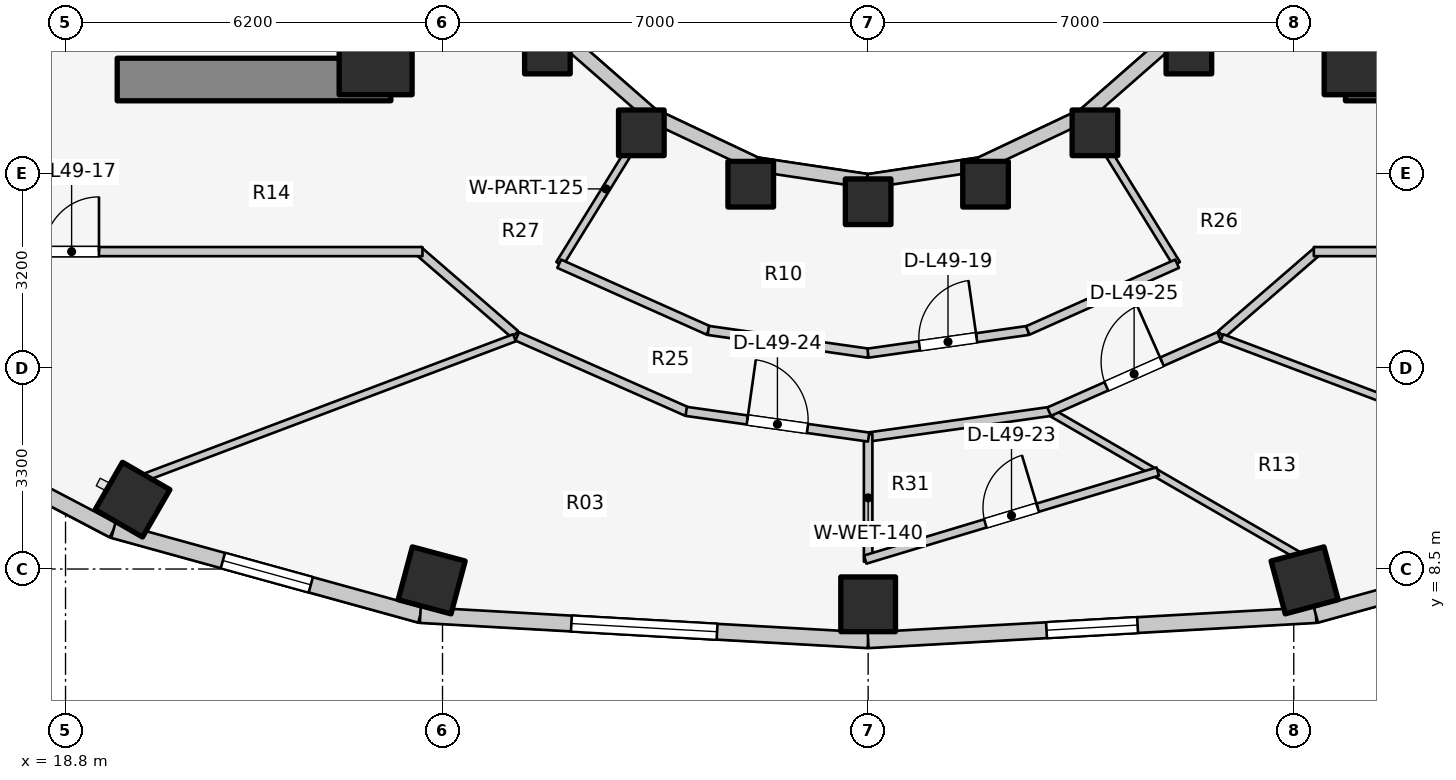
"""IFC4 building model, lengths in metres.
Left out: names, types, materials, properties, quantities, classifications, styles, units other than length and angle.
Written with IfcOpenShell. Run it as: python <this file> out.ifc"""

import sys

from ifc_helpers import new_model, si_unit, direction, frame, frame_2d, origin, origin_2d, place, context, subcontext, project, spatial, rectangle, extrude, element, fill, save


model = new_model("IFC4")
c1 = context("Model", 3, precision=1e-05, world=origin(), true_north=direction((0.0, 1.0)))
c2 = subcontext(c1, "Body", "Model", "MODEL_VIEW")
j1 = project(units=[si_unit("LENGTHUNIT", "METRE"), si_unit("PLANEANGLEUNIT", "RADIAN")], contexts=[c1])
p1 = place(None, origin())
s1 = spatial("IfcSite", under=j1, at=p1, CompositionType="ELEMENT")
p2 = place(p1, origin())
s2 = spatial("IfcBuilding", under=s1, at=p2, CompositionType="ELEMENT")
p3 = place(p2, frame((0.0, 0.0, 162.2)))
s3 = spatial("IfcBuildingStorey", under=s2, at=p3, CompositionType="ELEMENT", Elevation=162.2)
for number, where, z_axis, x_axis in (
    (1, (19.65, 16.55, 0.0), (0.0, 0.0, 1.0), (1.0, 0.0, 0.0)),
    (2, (39.85, 16.55, 0.0), (0.0, 0.0, 1.0), (1.0, 0.0, 0.0)),
):
    element("IfcWall", number, at=place(p3, frame(where, z_axis=z_axis, x_axis=x_axis)), inside=s3, PredefinedType="SHEAR", context=c2, shape_type="SweptSolid", body=[
        extrude(rectangle(XDim=4.5, YDim=0.7, at=frame_2d((2.25, 0.0))), origin(), (0.0, 0.0, 1.0), 3.1),
    ])
for number, where, z_axis, x_axis in (
    (3, (23.9, 16.9, 0.0), (0.0, 0.0, 1.0), (1.0, 0.0, 0.0)),
    (4, (40.1, 16.9, 0.0), (0.0, 0.0, 1.0), (1.0, 0.0, 0.0)),
):
    element("IfcColumn", number, at=place(p3, frame(where, z_axis=z_axis, x_axis=x_axis)), inside=s3, PredefinedType="COLUMN", context=c2, shape_type="SweptSolid", body=[
        extrude(rectangle(XDim=1.2, YDim=1.2, at=origin_2d()), origin(), (0.0, 0.0, 1.0), 3.1),
    ])
for number, where, z_axis, x_axis in (
    (5, (26.725, 17.018, 0.0), (0.0, 0.0, 1.0), (1.0, 0.0, 0.0)),
    (6, (28.27, 15.673, 0.0), (0.0, 0.0, 1.0), (1.0, 0.0, 0.0)),
):
    element("IfcColumn", number, at=place(p3, frame(where, z_axis=z_axis, x_axis=x_axis)), inside=s3, PredefinedType="COLUMN", context=c2, shape_type="SweptSolid", body=[
        extrude(rectangle(XDim=0.75, YDim=0.75, at=origin_2d()), origin(), (0.0, 0.0, 1.0), 3.1),
    ])
p4 = place(p3, frame((19.902, 9.641, 0.0), z_axis=(0.0, 0.0, 1.0), x_axis=(-0.5, -0.866025403784, 0.0)))
e7 = element("IfcColumn", 7, at=p4, inside=s3, PredefinedType="COLUMN", context=c2, shape_type="SweptSolid", body=[
    extrude(rectangle(XDim=0.9, YDim=0.9, at=origin_2d()), origin(), (0.0, 0.0, 1.0), 3.1),
])
p5 = place(p3, frame((30.069, 14.828, 0.0), z_axis=(0.0, 0.0, 1.0), x_axis=(1.0, 0.0, 0.0)))
e8 = element("IfcColumn", 8, at=p5, inside=s3, PredefinedType="COLUMN", context=c2, shape_type="SweptSolid", body=[
    extrude(rectangle(XDim=0.75, YDim=0.75, at=origin_2d()), origin(), (0.0, 0.0, 1.0), 3.1),
])
p6 = place(p3, frame((24.822, 8.313, 0.0), z_axis=(0.0, 0.0, 1.0), x_axis=(-0.258819045103, -0.965925826289, 0.0)))
e9 = element("IfcColumn", 9, at=p6, inside=s3, PredefinedType="COLUMN", context=c2, shape_type="SweptSolid", body=[
    extrude(rectangle(XDim=0.9, YDim=0.9, at=origin_2d()), origin(), (0.0, 0.0, 1.0), 3.1),
])
p7 = place(p3, frame((32.0, 14.54, 0.0), z_axis=(0.0, 0.0, 1.0), x_axis=(1.0, 0.0, 0.0)))
e10 = element("IfcColumn", 10, at=p7, inside=s3, PredefinedType="COLUMN", context=c2, shape_type="SweptSolid", body=[
    extrude(rectangle(XDim=0.75, YDim=0.75, at=origin_2d()), origin(), (0.0, 0.0, 1.0), 3.1),
])
p8 = place(p3, frame((32.0, 7.92, 0.0), z_axis=(0.0, 0.0, 1.0), x_axis=(0.0, -1.0, 0.0)))
e11 = element("IfcColumn", 11, at=p8, inside=s3, PredefinedType="COLUMN", context=c2, shape_type="SweptSolid", body=[
    extrude(rectangle(XDim=0.9, YDim=0.9, at=origin_2d()), origin(), (0.0, 0.0, 1.0), 3.1),
])
p9 = place(p3, frame((33.931, 14.828, 0.0), z_axis=(0.0, 0.0, 1.0), x_axis=(1.0, 0.0, 0.0)))
e12 = element("IfcColumn", 12, at=p9, inside=s3, PredefinedType="COLUMN", context=c2, shape_type="SweptSolid", body=[
    extrude(rectangle(XDim=0.75, YDim=0.75, at=origin_2d()), origin(), (0.0, 0.0, 1.0), 3.1),
])
p10 = place(p3, frame((39.178, 8.313, 0.0), z_axis=(0.0, 0.0, 1.0), x_axis=(0.258819045103, -0.965925826289, 0.0)))
e13 = element("IfcColumn", 13, at=p10, inside=s3, PredefinedType="COLUMN", context=c2, shape_type="SweptSolid", body=[
    extrude(rectangle(XDim=0.9, YDim=0.9, at=origin_2d()), origin(), (0.0, 0.0, 1.0), 3.1),
])
for number, where, z_axis, x_axis in (
    (14, (35.73, 15.673, 0.0), (0.0, 0.0, 1.0), (1.0, 0.0, 0.0)),
    (15, (37.275, 17.018, 0.0), (0.0, 0.0, 1.0), (1.0, 0.0, 0.0)),
):
    element("IfcColumn", number, at=place(p3, frame(where, z_axis=z_axis, x_axis=x_axis)), inside=s3, PredefinedType="COLUMN", context=c2, shape_type="SweptSolid", body=[
        extrude(rectangle(XDim=0.75, YDim=0.75, at=origin_2d()), origin(), (0.0, 0.0, 1.0), 3.1),
    ])
p11 = place(p3, frame((26.965, 17.258, 0.0), z_axis=(0.0, 0.0, 1.0), x_axis=(0.752576694707, -0.658504607869, 0.0)))
e16 = element("IfcWall", 16, at=p11, inside=s3, PredefinedType="STANDARD", context=c2, shape_type="SweptSolid", body=[
    extrude(rectangle(XDim=1.959, YDim=0.23, at=frame_2d((0.98, 0.0))), origin(), (0.0, 0.0, 1.0), 2.16),
])
p12 = place(p3, frame((28.44, 15.968, 0.0), z_axis=(0.0, 0.0, 1.0), x_axis=(0.904179699603, -0.427152280606, 0.0)))
e17 = element("IfcWall", 17, at=p12, inside=s3, PredefinedType="STANDARD", context=c2, shape_type="SweptSolid", body=[
    extrude(rectangle(XDim=1.899, YDim=0.23, at=frame_2d((0.95, 0.0))), origin(), (0.0, 0.0, 1.0), 2.16),
])
for number, where, z_axis, x_axis in (
    (18, (30.157, 15.157, 0.0), (0.0, 0.0, 1.0), (0.989, -0.149, 0.0)),
    (19, (32.0, 14.88, 0.0), (0.0, 0.0, 1.0), (0.989, 0.149, 0.0)),
):
    element("IfcWall", number, at=place(p3, frame(where, z_axis=z_axis, x_axis=x_axis)), inside=s3, PredefinedType="STANDARD", context=c2, shape_type="SweptSolid", body=[
        extrude(rectangle(XDim=1.864, YDim=0.23, at=frame_2d((0.932, 0.0))), origin(), (0.0, 0.0, 1.0), 2.16),
    ])
p13 = place(p3, frame((33.843, 15.157, 0.0), z_axis=(0.0, 0.0, 1.0), x_axis=(0.904179699603, 0.427152280606, 0.0)))
e20 = element("IfcWall", 20, at=p13, inside=s3, PredefinedType="STANDARD", context=c2, shape_type="SweptSolid", body=[
    extrude(rectangle(XDim=1.899, YDim=0.23, at=frame_2d((0.95, 0.0))), origin(), (0.0, 0.0, 1.0), 2.16),
])
p14 = place(p3, frame((35.56, 15.968, 0.0), z_axis=(0.0, 0.0, 1.0), x_axis=(0.752576694707, 0.658504607869, 0.0)))
e21 = element("IfcWall", 21, at=p14, inside=s3, PredefinedType="STANDARD", context=c2, shape_type="SweptSolid", body=[
    extrude(rectangle(XDim=1.959, YDim=0.23, at=frame_2d((0.98, 0.0))), origin(), (0.0, 0.0, 1.0), 2.16),
])
p15 = place(p3, frame((15.731, 11.158, 0.0), z_axis=(0.0, 0.0, 1.0), x_axis=(0.885660265226, -0.464333818065, 0.0)))
e22 = element("IfcWall", 22, at=p15, inside=s3, PredefinedType="STANDARD", context=c2, shape_type="SweptSolid", body=[
    extrude(rectangle(XDim=4.354, YDim=0.26, at=frame_2d((2.177, 0.0))), origin(), (0.0, 0.0, 1.0), 2.85),
])
p16 = place(p3, frame((19.587, 9.137, 0.0), z_axis=(0.0, 0.0, 1.0), x_axis=(0.963953455704, -0.26607092144, 0.0)))
e23 = element("IfcWall", 23, at=p16, inside=s3, PredefinedType="STANDARD", context=c2, shape_type="SweptSolid", body=[
    extrude(rectangle(XDim=5.237, YDim=0.26, at=frame_2d((2.618, 0.0))), origin(), (0.0, 0.0, 1.0), 2.85),
])
p17 = place(p16, frame((1.868, 0.0, 0.75)))
e24 = element("IfcOpeningElement", 24, at=p17, cuts=e23, PredefinedType="OPENING", context=c2, shape_type="SweptSolid", body=[
    extrude(rectangle(XDim=1.5, YDim=1.6, at=frame_2d((0.75, 0.8))), frame((0.0, 0.14, 0.0), z_axis=(0.0, -1.0, 0.0), x_axis=(1.0, 0.0, 0.0)), (0.0, 0.0, 1.0), 0.28),
])
p18 = place(p3, frame((24.635, 7.743, 0.0), z_axis=(0.0, 0.0, 1.0), x_axis=(0.998417906562, -0.056228852534, 0.0)))
e25 = element("IfcWall", 25, at=p18, inside=s3, PredefinedType="STANDARD", context=c2, shape_type="SweptSolid", body=[
    extrude(rectangle(XDim=7.377, YDim=0.26, at=frame_2d((3.688, 0.0))), origin(), (0.0, 0.0, 1.0), 2.85),
])
p19 = place(p18, frame((2.488, 0.0, 0.75)))
e26 = element("IfcOpeningElement", 26, at=p19, cuts=e25, PredefinedType="OPENING", context=c2, shape_type="SweptSolid", body=[
    extrude(rectangle(XDim=2.4, YDim=1.7, at=frame_2d((1.2, 0.85))), frame((0.0, 0.14, 0.0), z_axis=(0.0, -1.0, 0.0), x_axis=(1.0, 0.0, 0.0)), (0.0, 0.0, 1.0), 0.28),
])
p20 = place(p3, frame((32.0, 7.329, 0.0), z_axis=(0.0, 0.0, 1.0), x_axis=(0.998417906562, 0.056228852534, 0.0)))
e27 = element("IfcWall", 27, at=p20, inside=s3, PredefinedType="STANDARD", context=c2, shape_type="SweptSolid", body=[
    extrude(rectangle(XDim=7.377, YDim=0.26, at=frame_2d((3.688, 0.0))), origin(), (0.0, 0.0, 1.0), 2.85),
])
p21 = place(p20, frame((2.938, 0.0, 0.75)))
e28 = element("IfcOpeningElement", 28, at=p21, cuts=e27, PredefinedType="OPENING", context=c2, shape_type="SweptSolid", body=[
    extrude(rectangle(XDim=1.5, YDim=1.6, at=frame_2d((0.75, 0.8))), frame((0.0, 0.14, 0.0), z_axis=(0.0, -1.0, 0.0), x_axis=(1.0, 0.0, 0.0)), (0.0, 0.0, 1.0), 0.28),
])
p22 = place(p3, frame((39.365, 7.743, 0.0), z_axis=(0.0, 0.0, 1.0), x_axis=(0.963953455704, 0.26607092144, 0.0)))
e29 = element("IfcWall", 29, at=p22, inside=s3, PredefinedType="STANDARD", context=c2, shape_type="SweptSolid", body=[
    extrude(rectangle(XDim=5.237, YDim=0.26, at=frame_2d((2.618, 0.0))), origin(), (0.0, 0.0, 1.0), 2.85),
])
p23 = place(p22, frame((1.868, 0.0, 0.75)))
e30 = element("IfcOpeningElement", 30, at=p23, cuts=e29, PredefinedType="OPENING", context=c2, shape_type="SweptSolid", body=[
    extrude(rectangle(XDim=1.5, YDim=1.6, at=frame_2d((0.75, 0.8))), frame((0.0, 0.14, 0.0), z_axis=(0.0, -1.0, 0.0), x_axis=(1.0, 0.0, 0.0)), (0.0, 0.0, 1.0), 0.28),
])
p24 = place(p3, frame((26.193, 12.358, 0.0), z_axis=(0.0, 0.0, 1.0), x_axis=(-0.756055312247, 0.654507727092, 0.0)))
e31 = element("IfcWall", 31, at=p24, inside=s3, PredefinedType="PARTITIONING", context=c2, shape_type="SweptSolid", body=[
    extrude(rectangle(XDim=2.111, YDim=0.15, at=frame_2d((1.055, 0.0))), origin(), (0.0, 0.0, 1.0), 2.299),
])
p25 = place(p3, frame((17.15, 13.72, 0.0), z_axis=(0.0, 0.0, 1.0), x_axis=(1.0, 0.0, 0.0)))
e32 = element("IfcWall", 32, at=p25, inside=s3, PredefinedType="PARTITIONING", context=c2, shape_type="SweptSolid", body=[
    extrude(rectangle(XDim=7.52, YDim=0.15, at=frame_2d((3.76, 0.0))), origin(), (0.0, 0.0, 1.0), 2.299),
])
p26 = place(p25, frame((1.3, 0.0, 0.0)))
e33 = element("IfcOpeningElement", 33, at=p26, cuts=e32, PredefinedType="OPENING", context=c2, shape_type="SweptSolid", body=[
    extrude(rectangle(XDim=0.9, YDim=2.1, at=frame_2d((0.45, 1.05))), frame((0.0, 0.085, 0.0), z_axis=(0.0, -1.0, 0.0), x_axis=(1.0, 0.0, 0.0)), (0.0, 0.0, 1.0), 0.17),
])
p27 = place(p3, frame((37.807, 12.358, 0.0), z_axis=(0.0, 0.0, 1.0), x_axis=(0.756055312247, 0.654507727092, 0.0)))
e34 = element("IfcWall", 34, at=p27, inside=s3, PredefinedType="PARTITIONING", context=c2, shape_type="SweptSolid", body=[
    extrude(rectangle(XDim=2.111, YDim=0.15, at=frame_2d((1.055, 0.0))), origin(), (0.0, 0.0, 1.0), 2.299),
])
p28 = place(p3, frame((39.33, 13.72, 0.0), z_axis=(0.0, 0.0, 1.0), x_axis=(1.0, 0.0, 0.0)))
e35 = element("IfcWall", 35, at=p28, inside=s3, PredefinedType="PARTITIONING", context=c2, shape_type="SweptSolid", body=[
    extrude(rectangle(XDim=7.52, YDim=0.15, at=frame_2d((3.76, 0.0))), origin(), (0.0, 0.0, 1.0), 2.299),
])
p29 = place(p28, frame((5.22, 0.0, 0.0)))
e36 = element("IfcOpeningElement", 36, at=p29, cuts=e35, PredefinedType="OPENING", context=c2, shape_type="SweptSolid", body=[
    extrude(rectangle(XDim=0.9, YDim=2.1, at=frame_2d((0.45, 1.05))), frame((0.0, 0.085, 0.0), z_axis=(0.0, -1.0, 0.0), x_axis=(1.0, 0.0, 0.0)), (0.0, 0.0, 1.0), 0.17),
])
for number, where, z_axis, x_axis in (
    (37, (28.45, 15.985, 0.0), (0.0, 0.0, 1.0), (-0.526, -0.851, 0.0)),
    (38, (35.55, 15.985, 0.0), (0.0, 0.0, 1.0), (0.526, -0.851, 0.0)),
):
    element("IfcWall", number, at=place(p3, frame(where, z_axis=z_axis, x_axis=x_axis)), inside=s3, PredefinedType="PARTITIONING", context=c2, shape_type="SweptSolid", body=[
        extrude(rectangle(XDim=2.901, YDim=0.125, at=frame_2d((1.451, 0.0))), origin(), (0.0, 0.0, 1.0), 2.299),
    ])
p30 = place(p3, frame((26.919, 13.521, 0.0), z_axis=(0.0, 0.0, 1.0), x_axis=(0.912888568324, -0.408208845842, 0.0)))
e39 = element("IfcWall", 39, at=p30, inside=s3, PredefinedType="PARTITIONING", context=c2, shape_type="SweptSolid", body=[
    extrude(rectangle(XDim=2.69, YDim=0.15, at=frame_2d((1.345, 0.0))), origin(), (0.0, 0.0, 1.0), 2.299),
])
p31 = place(p3, frame((29.371, 12.424, 0.0), z_axis=(0.0, 0.0, 1.0), x_axis=(0.990066775667, -0.1405979364, 0.0)))
e40 = element("IfcWall", 40, at=p31, inside=s3, PredefinedType="PARTITIONING", context=c2, shape_type="SweptSolid", body=[
    extrude(rectangle(XDim=2.657, YDim=0.15, at=frame_2d((1.328, 0.0))), origin(), (0.0, 0.0, 1.0), 2.299),
])
p32 = place(p3, frame((31.998, 12.05, 0.0), z_axis=(0.0, 0.0, 1.0), x_axis=(0.990066775667, 0.1405979364, 0.0)))
e41 = element("IfcWall", 41, at=p32, inside=s3, PredefinedType="PARTITIONING", context=c2, shape_type="SweptSolid", body=[
    extrude(rectangle(XDim=2.657, YDim=0.15, at=frame_2d((1.328, 0.0))), origin(), (0.0, 0.0, 1.0), 2.299),
])
p33 = place(p32, frame((0.854, 0.0, 0.0)))
e42 = element("IfcOpeningElement", 42, at=p33, cuts=e41, PredefinedType="OPENING", context=c2, shape_type="SweptSolid", body=[
    extrude(rectangle(XDim=0.95, YDim=2.1, at=frame_2d((0.475, 1.05))), frame((0.0, 0.085, 0.0), z_axis=(0.0, -1.0, 0.0), x_axis=(1.0, 0.0, 0.0)), (0.0, 0.0, 1.0), 0.17),
])
p34 = place(p3, frame((34.625, 12.423, 0.0), z_axis=(0.0, 0.0, 1.0), x_axis=(0.912888568324, 0.408208845842, 0.0)))
e43 = element("IfcWall", 43, at=p34, inside=s3, PredefinedType="PARTITIONING", context=c2, shape_type="SweptSolid", body=[
    extrude(rectangle(XDim=2.69, YDim=0.15, at=frame_2d((1.345, 0.0))), origin(), (0.0, 0.0, 1.0), 2.299),
])
p35 = place(p3, frame((26.184, 12.302, 0.0), z_axis=(0.0, 0.0, 1.0), x_axis=(-0.935601484289, -0.353057874288, 0.0)))
e44 = element("IfcWall", 44, at=p35, inside=s3, PredefinedType="PARTITIONING", context=c2, shape_type="SweptSolid", body=[
    extrude(rectangle(XDim=6.484, YDim=0.125, at=frame_2d((3.242, 0.0))), origin(), (0.0, 0.0, 1.0), 2.299),
])
p36 = place(p3, frame((35.032, 11.062, 0.0), z_axis=(0.0, 0.0, 1.0), x_axis=(0.865627016774, -0.500689392568, 0.0)))
e45 = element("IfcWall", 45, at=p36, inside=s3, PredefinedType="PARTITIONING", context=c2, shape_type="SweptSolid", body=[
    extrude(rectangle(XDim=4.662, YDim=0.125, at=frame_2d((2.331, 0.0))), origin(), (0.0, 0.0, 1.0), 2.299),
])
p37 = place(p3, frame((37.816, 12.302, 0.0), z_axis=(0.0, 0.0, 1.0), x_axis=(0.935601484289, -0.353057874288, 0.0)))
e46 = element("IfcWall", 46, at=p37, inside=s3, PredefinedType="PARTITIONING", context=c2, shape_type="SweptSolid", body=[
    extrude(rectangle(XDim=6.484, YDim=0.125, at=frame_2d((3.242, 0.0))), origin(), (0.0, 0.0, 1.0), 2.299),
])
p38 = place(p3, frame((31.95, 10.663, 0.0), z_axis=(0.0, 0.0, 1.0), x_axis=(0.990234434447, 0.139412211929, 0.0)))
e47 = element("IfcWall", 47, at=p38, inside=s3, PredefinedType="PARTITIONING", context=c2, shape_type="SweptSolid", body=[
    extrude(rectangle(XDim=3.114, YDim=0.15, at=frame_2d((1.557, 0.0))), origin(), (0.0, 0.0, 1.0), 2.299),
])
p39 = place(p3, frame((32.0, 10.72, 0.0), z_axis=(0.0, 0.0, 1.0), x_axis=(0.0, -1.0, 0.0)))
e48 = element("IfcWall", 48, at=p39, inside=s3, PredefinedType="PLUMBINGWALL", context=c2, shape_type="SweptSolid", body=[
    extrude(rectangle(XDim=2.1, YDim=0.14, at=frame_2d((1.05, 0.0))), origin(), (0.0, 0.0, 1.0), 2.299),
])
p40 = place(p3, frame((31.952, 8.656, 0.0), z_axis=(0.0, 0.0, 1.0), x_axis=(0.957599969859, 0.28810119355, 0.0)))
e49 = element("IfcWall", 49, at=p40, inside=s3, PredefinedType="PLUMBINGWALL", context=c2, shape_type="SweptSolid", body=[
    extrude(rectangle(XDim=5.024, YDim=0.14, at=frame_2d((2.512, 0.0))), origin(), (0.0, 0.0, 1.0), 2.299),
])
p41 = place(p40, frame((2.062, 0.0, 0.0)))
e50 = element("IfcOpeningElement", 50, at=p41, cuts=e49, PredefinedType="OPENING", context=c2, shape_type="SweptSolid", body=[
    extrude(rectangle(XDim=0.9, YDim=2.1, at=frame_2d((0.45, 1.05))), frame((0.0, 0.08, 0.0), z_axis=(0.0, -1.0, 0.0), x_axis=(1.0, 0.0, 0.0)), (0.0, 0.0, 1.0), 0.16),
])
p42 = place(p3, frame((26.228, 12.326, 0.0), z_axis=(0.0, 0.0, 1.0), x_axis=(0.914324470734, -0.404982422108, 0.0)))
e51 = element("IfcWall", 51, at=p42, inside=s3, PredefinedType="PARTITIONING", context=c2, shape_type="SweptSolid", body=[
    extrude(rectangle(XDim=3.058, YDim=0.15, at=frame_2d((1.529, 0.0))), origin(), (0.0, 0.0, 1.0), 2.299),
])
p43 = place(p3, frame((29.008, 11.092, 0.0), z_axis=(0.0, 0.0, 1.0), x_axis=(0.990234341072, -0.139412875167, 0.0)))
e52 = element("IfcWall", 52, at=p43, inside=s3, PredefinedType="PARTITIONING", context=c2, shape_type="SweptSolid", body=[
    extrude(rectangle(XDim=3.03, YDim=0.15, at=frame_2d((1.515, 0.0))), origin(), (0.0, 0.0, 1.0), 2.299),
])
p44 = place(p43, frame((1.015, 0.0, 0.0)))
e53 = element("IfcOpeningElement", 53, at=p44, cuts=e52, PredefinedType="OPENING", context=c2, shape_type="SweptSolid", body=[
    extrude(rectangle(XDim=1.0, YDim=2.1, at=frame_2d((0.5, 1.05))), frame((0.0, 0.085, 0.0), z_axis=(0.0, -1.0, 0.0), x_axis=(1.0, 0.0, 0.0)), (0.0, 0.0, 1.0), 0.17),
])
p45 = place(p3, frame((34.976, 11.088, 0.0), z_axis=(0.0, 0.0, 1.0), x_axis=(0.914324470734, 0.404982422108, 0.0)))
e54 = element("IfcWall", 54, at=p45, inside=s3, PredefinedType="PARTITIONING", context=c2, shape_type="SweptSolid", body=[
    extrude(rectangle(XDim=3.058, YDim=0.15, at=frame_2d((1.529, 0.0))), origin(), (0.0, 0.0, 1.0), 2.299),
])
p46 = place(p45, frame((1.029, 0.0, 0.0)))
e55 = element("IfcOpeningElement", 55, at=p46, cuts=e54, PredefinedType="OPENING", context=c2, shape_type="SweptSolid", body=[
    extrude(rectangle(XDim=1.0, YDim=2.1, at=frame_2d((0.5, 1.05))), frame((0.0, 0.085, 0.0), z_axis=(0.0, -1.0, 0.0), x_axis=(1.0, 0.0, 0.0)), (0.0, 0.0, 1.0), 0.17),
])
p47 = place(p17, origin())
e56 = element("IfcWindow", 56, at=p47, inside=s3, PartitioningType="SINGLE_PANEL", PredefinedType="WINDOW", context=c2, shape_type="SweptSolid", body=[
    extrude(rectangle(XDim=1.5, YDim=1.6, at=frame_2d((0.75, 0.8))), frame((0.0, 0.03, 0.0), z_axis=(0.0, -1.0, 0.0), x_axis=(1.0, 0.0, 0.0)), (0.0, 0.0, 1.0), 0.06),
])
fill(e24, e56)
p48 = place(p19, origin())
e57 = element("IfcWindow", 57, at=p48, inside=s3, PartitioningType="SINGLE_PANEL", PredefinedType="WINDOW", context=c2, shape_type="SweptSolid", body=[
    extrude(rectangle(XDim=2.4, YDim=1.7, at=frame_2d((1.2, 0.85))), frame((0.0, 0.03, 0.0), z_axis=(0.0, -1.0, 0.0), x_axis=(1.0, 0.0, 0.0)), (0.0, 0.0, 1.0), 0.06),
])
fill(e26, e57)
p49 = place(p21, origin())
e58 = element("IfcWindow", 58, at=p49, inside=s3, PartitioningType="SINGLE_PANEL", PredefinedType="WINDOW", context=c2, shape_type="SweptSolid", body=[
    extrude(rectangle(XDim=1.5, YDim=1.6, at=frame_2d((0.75, 0.8))), frame((0.0, 0.03, 0.0), z_axis=(0.0, -1.0, 0.0), x_axis=(1.0, 0.0, 0.0)), (0.0, 0.0, 1.0), 0.06),
])
fill(e28, e58)
p50 = place(p26, origin())
e59 = element("IfcDoor", 59, at=p50, inside=s3, OperationType="SINGLE_SWING_RIGHT", PredefinedType="DOOR", context=c2, shape_type="SweptSolid", body=[
    extrude(rectangle(XDim=0.9, YDim=2.1, at=frame_2d((0.45, 1.05))), frame((0.0, 0.025, 0.0), z_axis=(0.0, -1.0, 0.0), x_axis=(1.0, 0.0, 0.0)), (0.0, 0.0, 1.0), 0.05),
])
fill(e33, e59)
p51 = place(p33, origin())
e60 = element("IfcDoor", 60, at=p51, inside=s3, OperationType="SINGLE_SWING_RIGHT", PredefinedType="DOOR", context=c2, shape_type="SweptSolid", body=[
    extrude(rectangle(XDim=0.95, YDim=2.1, at=frame_2d((0.475, 1.05))), frame((0.0, 0.025, 0.0), z_axis=(0.0, -1.0, 0.0), x_axis=(1.0, 0.0, 0.0)), (0.0, 0.0, 1.0), 0.05),
])
fill(e42, e60)
p52 = place(p41, origin())
e61 = element("IfcDoor", 61, at=p52, inside=s3, OperationType="SINGLE_SWING_RIGHT", PredefinedType="DOOR", context=c2, shape_type="SweptSolid", body=[
    extrude(rectangle(XDim=0.9, YDim=2.1, at=frame_2d((0.45, 1.05))), frame((0.0, 0.025, 0.0), z_axis=(0.0, -1.0, 0.0), x_axis=(1.0, 0.0, 0.0)), (0.0, 0.0, 1.0), 0.05),
])
fill(e50, e61)
p53 = place(p44, origin())
e62 = element("IfcDoor", 62, at=p53, inside=s3, OperationType="SINGLE_SWING_LEFT", PredefinedType="DOOR", context=c2, shape_type="SweptSolid", body=[
    extrude(rectangle(XDim=1.0, YDim=2.1, at=frame_2d((0.5, 1.05))), frame((0.0, 0.025, 0.0), z_axis=(0.0, -1.0, 0.0), x_axis=(1.0, 0.0, 0.0)), (0.0, 0.0, 1.0), 0.05),
])
fill(e53, e62)
p54 = place(p46, origin())
e63 = element("IfcDoor", 63, at=p54, inside=s3, OperationType="SINGLE_SWING_RIGHT", PredefinedType="DOOR", context=c2, shape_type="SweptSolid", body=[
    extrude(rectangle(XDim=1.0, YDim=2.1, at=frame_2d((0.5, 1.05))), frame((0.0, 0.025, 0.0), z_axis=(0.0, -1.0, 0.0), x_axis=(1.0, 0.0, 0.0)), (0.0, 0.0, 1.0), 0.05),
])
fill(e55, e63)
save(model, sys.argv[1])
